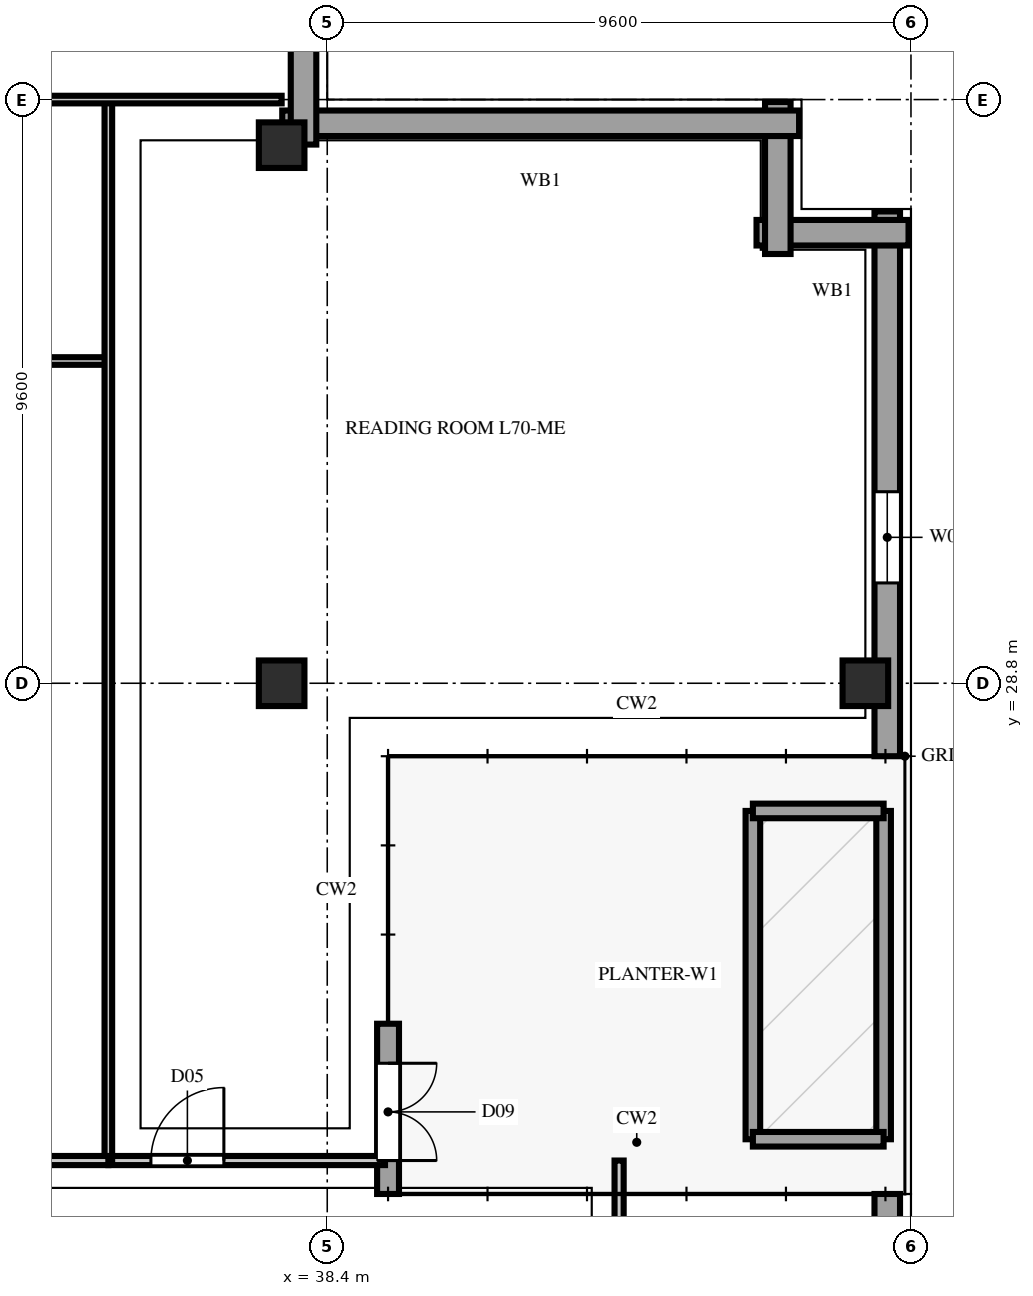
"""IFC4 building model, lengths in metres.
Left out: names, types, materials, properties, quantities, classifications, styles, units other than length and angle.
Written with IfcOpenShell. Run it as: python <this file> out.ifc"""

import sys

from ifc_helpers import new_model, si_unit, direction, frame, frame_2d, origin, origin_2d, place, context, subcontext, project, spatial, rectangle, extrude, element, fill, save


model = new_model("IFC4")
c1 = context("Model", 3, precision=1e-05, world=origin(), true_north=direction((0.0, 1.0)))
c2 = subcontext(c1, "Body", "Model", "MODEL_VIEW")
j1 = project(units=[si_unit("LENGTHUNIT", "METRE"), si_unit("PLANEANGLEUNIT", "RADIAN")], contexts=[c1])
p1 = place(None, origin())
s1 = spatial("IfcSite", under=j1, at=p1, CompositionType="ELEMENT")
p2 = place(p1, origin())
s2 = spatial("IfcBuilding", under=s1, at=p2, CompositionType="ELEMENT")
p3 = place(p2, frame((0.0, 0.0, 277.2)))
s3 = spatial("IfcBuildingStorey", under=s2, at=p3, CompositionType="ELEMENT", Elevation=277.2)
for number, where, z_axis, x_axis in (
    (1, (37.65, 28.8, 0.0), (0.0, 0.0, 1.0), (1.0, 0.0, 0.0)),
    (2, (37.65, 37.65, 0.0), (0.0, 0.0, 1.0), (1.0, 0.0, 0.0)),
    (3, (47.25, 28.8, 0.0), (0.0, 0.0, 1.0), (1.0, 0.0, 0.0)),
):
    element("IfcColumn", number, at=place(p3, frame(where, z_axis=z_axis, x_axis=x_axis)), inside=s3, PredefinedType="COLUMN", context=c2, shape_type="SweptSolid", body=[
        extrude(rectangle(XDim=0.75, YDim=0.75, at=origin_2d()), origin(), (0.0, 0.0, 1.0), 3.8),
    ])
p4 = place(p3, frame((47.61, 1.84, 0.0), z_axis=(0.0, 0.0, 1.0), x_axis=(0.0, 1.0, 0.0)))
e4 = element("IfcWall", 4, at=p4, inside=s3, PredefinedType="SOLIDWALL", context=c2, shape_type="SweptSolid", body=[
    extrude(rectangle(XDim=18.56, YDim=0.42, at=frame_2d((9.28, 0.0))), origin(), (0.0, 0.0, 1.0), 3.54),
])
p5 = place(p4, frame((4.61, 0.0, 0.85)))
e5 = element("IfcOpeningElement", 5, at=p5, cuts=e4, PredefinedType="OPENING", context=c2, shape_type="SweptSolid", body=[
    extrude(rectangle(XDim=1.5, YDim=1.85, at=frame_2d((0.75, 0.925))), frame((0.0, 0.222, 0.0), z_axis=(0.0, -1.0, 0.0), x_axis=(1.0, 0.0, 0.0)), (0.0, 0.0, 1.0), 0.444),
])
p6 = place(p4, frame((9.41, 0.0, 0.85)))
e6 = element("IfcOpeningElement", 6, at=p6, cuts=e4, PredefinedType="OPENING", context=c2, shape_type="SweptSolid", body=[
    extrude(rectangle(XDim=1.5, YDim=1.85, at=frame_2d((0.75, 0.925))), frame((0.0, 0.222, 0.0), z_axis=(0.0, -1.0, 0.0), x_axis=(1.0, 0.0, 0.0)), (0.0, 0.0, 1.0), 0.444),
])
p7 = place(p4, frame((14.21, 0.0, 0.85)))
e7 = element("IfcOpeningElement", 7, at=p7, cuts=e4, PredefinedType="OPENING", context=c2, shape_type="SweptSolid", body=[
    extrude(rectangle(XDim=1.5, YDim=1.85, at=frame_2d((0.75, 0.925))), frame((0.0, 0.222, 0.0), z_axis=(0.0, -1.0, 0.0), x_axis=(1.0, 0.0, 0.0)), (0.0, 0.0, 1.0), 0.444),
])
p8 = place(p3, frame((47.61, 27.6, 0.0), z_axis=(0.0, 0.0, 1.0), x_axis=(0.0, 1.0, 0.0)))
e8 = element("IfcWall", 8, at=p8, inside=s3, PredefinedType="SOLIDWALL", context=c2, shape_type="SweptSolid", body=[
    extrude(rectangle(XDim=8.96, YDim=0.42, at=frame_2d((4.48, 0.0))), origin(), (0.0, 0.0, 1.0), 3.54),
])
p9 = place(p8, frame((2.85, 0.0, 0.85)))
e9 = element("IfcOpeningElement", 9, at=p9, cuts=e8, PredefinedType="OPENING", context=c2, shape_type="SweptSolid", body=[
    extrude(rectangle(XDim=1.5, YDim=1.85, at=frame_2d((0.75, 0.925))), frame((0.0, 0.222, 0.0), z_axis=(0.0, -1.0, 0.0), x_axis=(1.0, 0.0, 0.0)), (0.0, 0.0, 1.0), 0.444),
])
for number, where, z_axis, x_axis in (
    (10, (47.96, 36.21, 0.0), (0.0, 0.0, 1.0), (-1.0, 0.0, 0.0)),
    (11, (45.81, 35.86, 0.0), (0.0, 0.0, 1.0), (0.0, 1.0, 0.0)),
):
    element("IfcWall", number, at=place(p3, frame(where, z_axis=z_axis, x_axis=x_axis)), inside=s3, PredefinedType="SOLIDWALL", context=c2, shape_type="SweptSolid", body=[
        extrude(rectangle(XDim=2.5, YDim=0.42, at=frame_2d((1.25, 0.0))), origin(), (0.0, 0.0, 1.0), 3.54),
    ])
for number, where, z_axis, x_axis in (
    (12, (46.16, 38.01, 0.0), (0.0, 0.0, 1.0), (-1.0, 0.0, 0.0)),
    (13, (38.01, 37.66, 0.0), (0.0, 0.0, 1.0), (0.0, 1.0, 0.0)),
):
    element("IfcWall", number, at=place(p3, frame(where, z_axis=z_axis, x_axis=x_axis)), inside=s3, PredefinedType="SOLIDWALL", context=c2, shape_type="SweptSolid", body=[
        extrude(rectangle(XDim=8.5, YDim=0.42, at=frame_2d((4.25, 0.0))), origin(), (0.0, 0.0, 1.0), 3.54),
    ])
p10 = place(p3, frame((39.4, 20.4, 0.0), z_axis=(0.0, 0.0, 1.0), x_axis=(0.0, 1.0, 0.0)))
e14 = element("IfcWall", 14, at=p10, inside=s3, PredefinedType="SOLIDWALL", context=c2, shape_type="SweptSolid", body=[
    extrude(rectangle(XDim=2.8, YDim=0.36, at=frame_2d((1.4, 0.0))), origin(), (0.0, 0.0, 1.0), 3.54),
])
p11 = place(p10, frame((0.55, 0.0, 0.0)))
e15 = element("IfcOpeningElement", 15, at=p11, cuts=e14, PredefinedType="OPENING", context=c2, shape_type="SweptSolid", body=[
    extrude(rectangle(XDim=1.6, YDim=2.3, at=frame_2d((0.8, 1.15))), frame((0.0, 0.192, 0.0), z_axis=(0.0, -1.0, 0.0), x_axis=(1.0, 0.0, 0.0)), (0.0, 0.0, 1.0), 0.384),
])
for number, where, z_axis, x_axis in (
    (16, (45.4, 21.3, 0.0), (0.0, 0.0, 1.0), (0.0, 1.0, 0.0)),
    (17, (47.55, 21.3, 0.0), (0.0, 0.0, 1.0), (0.0, 1.0, 0.0)),
):
    element("IfcWall", number, at=place(p3, frame(where, z_axis=z_axis, x_axis=x_axis)), inside=s3, PredefinedType="USERDEFINED", context=c2, shape_type="SweptSolid", body=[
        extrude(rectangle(XDim=5.4, YDim=0.24, at=frame_2d((2.7, 0.0))), origin(), (0.0, 0.0, 1.0), 0.62),
    ])
for number, where, z_axis, x_axis in (
    (18, (45.4, 21.3, 0.0), (0.0, 0.0, 1.0), (1.0, 0.0, 0.0)),
    (19, (45.4, 26.7, 0.0), (0.0, 0.0, 1.0), (1.0, 0.0, 0.0)),
):
    element("IfcWall", number, at=place(p3, frame(where, z_axis=z_axis, x_axis=x_axis)), inside=s3, PredefinedType="USERDEFINED", context=c2, shape_type="SweptSolid", body=[
        extrude(rectangle(XDim=2.15, YDim=0.24, at=frame_2d((1.075, 0.0))), origin(), (0.0, 0.0, 1.0), 0.62),
    ])
p12 = place(p3, frame((43.2, 18.1, 0.0), z_axis=(0.0, 0.0, 1.0), x_axis=(0.0, 1.0, 0.0)))
e20 = element("IfcWall", 20, at=p12, inside=s3, PredefinedType="PARTITIONING", context=c2, shape_type="SweptSolid", body=[
    extrude(rectangle(XDim=2.85, YDim=0.15, at=frame_2d((1.425, 0.0))), origin(), (0.0, 0.0, 1.0), 3.54),
])
p13 = place(p3, frame((19.2, 34.1, 0.0), z_axis=(0.0, 0.0, 1.0), x_axis=(1.0, 0.0, 0.0)))
e21 = element("IfcWall", 21, at=p13, inside=s3, PredefinedType="PARTITIONING", context=c2, shape_type="SweptSolid", body=[
    extrude(rectangle(XDim=15.6, YDim=0.125, at=frame_2d((7.8, 0.0))), origin(), (0.0, 0.0, 1.0), 3.54),
])
p14 = place(p3, frame((34.8, 20.95, 0.0), z_axis=(0.0, 0.0, 1.0), x_axis=(1.0, 0.0, 0.0)))
e22 = element("IfcWall", 22, at=p14, inside=s3, PredefinedType="PARTITIONING", context=c2, shape_type="SweptSolid", body=[
    extrude(rectangle(XDim=4.55, YDim=0.15, at=frame_2d((2.275, 0.0))), origin(), (0.0, 0.0, 1.0), 3.54),
])
p15 = place(p14, frame((0.7, 0.0, 0.0)))
e23 = element("IfcOpeningElement", 23, at=p15, cuts=e22, PredefinedType="OPENING", context=c2, shape_type="SweptSolid", body=[
    extrude(rectangle(XDim=1.2, YDim=2.2, at=frame_2d((0.6, 1.1))), frame((0.0, 0.087, 0.0), z_axis=(0.0, -1.0, 0.0), x_axis=(1.0, 0.0, 0.0)), (0.0, 0.0, 1.0), 0.174),
])
p16 = place(p3, frame((34.8, 20.95, 0.0), z_axis=(0.0, 0.0, 1.0), x_axis=(0.0, 1.0, 0.0)))
e24 = element("IfcWall", 24, at=p16, inside=s3, PredefinedType="PARTITIONING", context=c2, shape_type="SweptSolid", body=[
    extrude(rectangle(XDim=17.45, YDim=0.125, at=frame_2d((8.725, 0.0))), origin(), (0.0, 0.0, 1.0), 3.54),
])
p17 = place(p3, frame((19.28, 38.4, 0.0), z_axis=(0.0, 0.0, 1.0), x_axis=(1.0, 0.0, 0.0)))
e25 = element("IfcWall", 25, at=p17, inside=s3, PredefinedType="PARTITIONING", context=c2, shape_type="SweptSolid", body=[
    extrude(rectangle(XDim=18.37, YDim=0.125, at=frame_2d((9.185, 0.0))), origin(), (0.0, 0.0, 1.0), 3.54),
])
p18 = place(p3, frame((29.35, 20.95, 0.0), z_axis=(0.0, 0.0, 1.0), x_axis=(1.0, 0.0, 0.0)))
e26 = element("IfcWall", 26, at=p18, inside=s3, PredefinedType="PARTITIONING", context=c2, shape_type="SweptSolid", body=[
    extrude(rectangle(XDim=5.45, YDim=0.15, at=frame_2d((2.725, 0.0))), origin(), (0.0, 0.0, 1.0), 3.54),
])
p19 = place(p18, frame((2.2, 0.0, 0.0)))
e27 = element("IfcOpeningElement", 27, at=p19, cuts=e26, PredefinedType="OPENING", context=c2, shape_type="SweptSolid", body=[
    extrude(rectangle(XDim=0.95, YDim=2.15, at=frame_2d((0.475, 1.075))), frame((0.0, 0.087, 0.0), z_axis=(0.0, -1.0, 0.0), x_axis=(1.0, 0.0, 0.0)), (0.0, 0.0, 1.0), 0.174),
])
p20 = place(p9, origin())
e28 = element("IfcWindow", 28, at=p20, inside=s3, PartitioningType="DOUBLE_PANEL_VERTICAL", PredefinedType="WINDOW", context=c2, shape_type="SweptSolid", body=[
    extrude(rectangle(XDim=1.5, YDim=1.85, at=frame_2d((0.75, 0.925))), frame((0.0, 0.11, 0.0), z_axis=(0.0, -1.0, 0.0), x_axis=(1.0, 0.0, 0.0)), (0.0, 0.0, 1.0), 0.06),
])
fill(e9, e28)
p21 = place(p11, frame((1.6, 0.0, 0.0), z_axis=(0.0, 0.0, 1.0), x_axis=(-1.0, 0.0, 0.0)))
e29 = element("IfcDoor", 29, at=p21, inside=s3, OperationType="DOUBLE_SWING_LEFT", PredefinedType="DOOR", context=c2, shape_type="SweptSolid", body=[
    extrude(rectangle(XDim=1.6, YDim=2.3, at=frame_2d((0.8, 1.15))), frame((0.0, 0.025, 0.0), z_axis=(0.0, -1.0, 0.0), x_axis=(1.0, 0.0, 0.0)), (0.0, 0.0, 1.0), 0.05),
])
fill(e15, e29)
p22 = place(p15, origin())
e30 = element("IfcDoor", 30, at=p22, inside=s3, OperationType="SINGLE_SWING_RIGHT", PredefinedType="DOOR", context=c2, shape_type="SweptSolid", body=[
    extrude(rectangle(XDim=1.2, YDim=2.2, at=frame_2d((0.6, 1.1))), frame((0.0, 0.025, 0.0), z_axis=(0.0, -1.0, 0.0), x_axis=(1.0, 0.0, 0.0)), (0.0, 0.0, 1.0), 0.05),
])
fill(e23, e30)
save(model, sys.argv[1])
